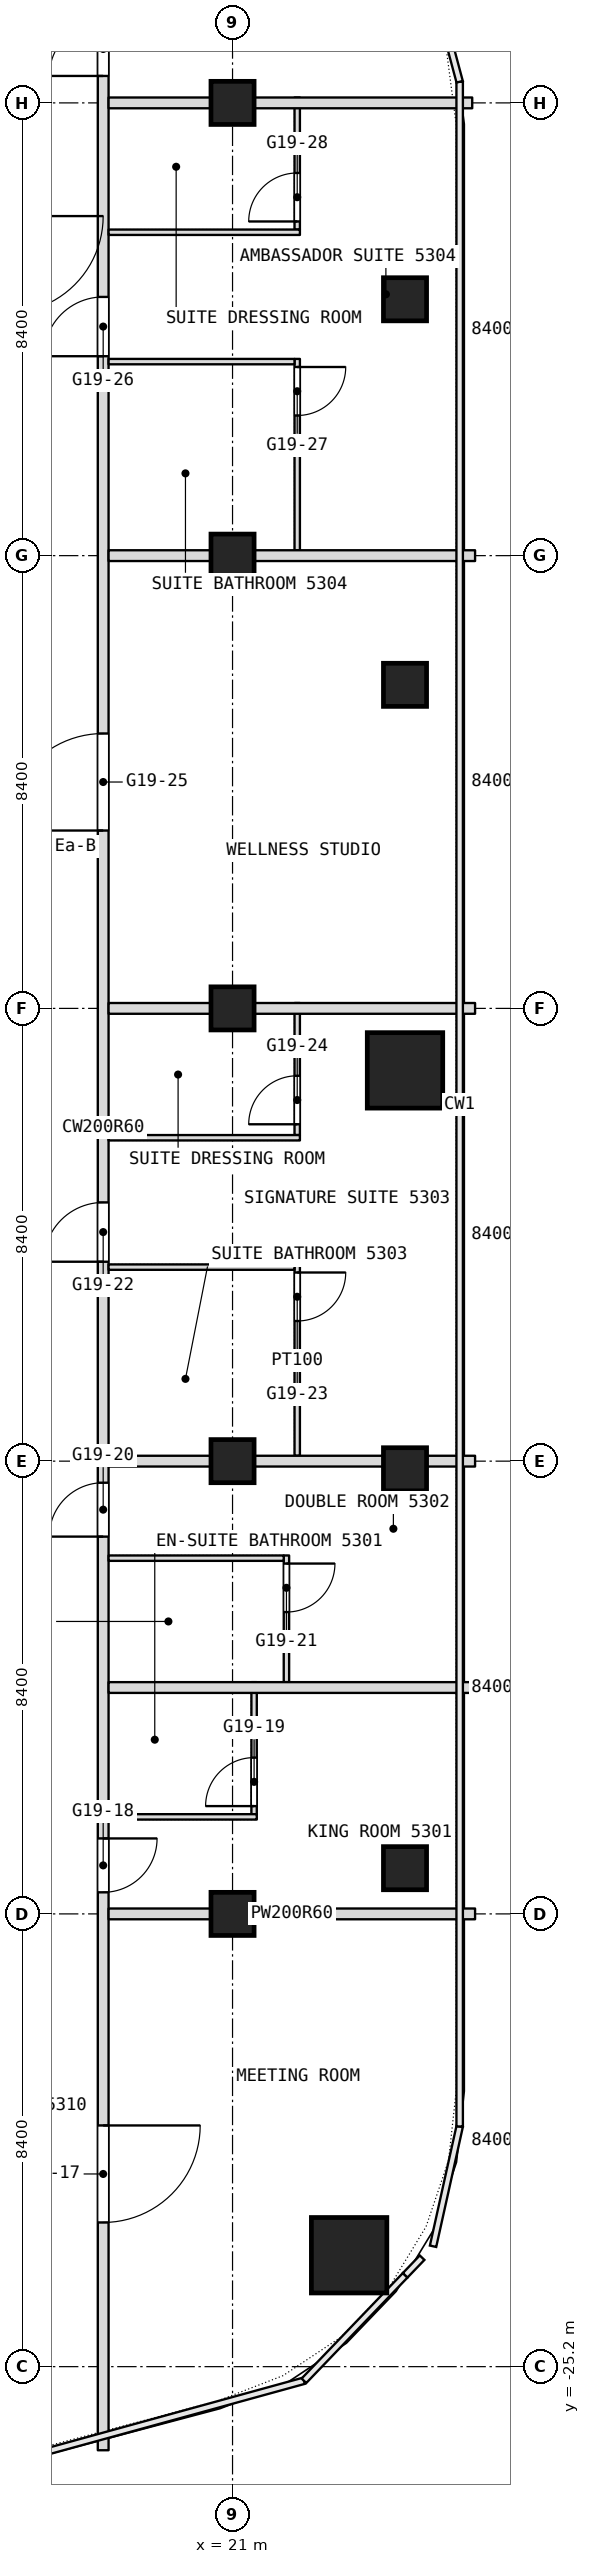
"""IFC4 building model, lengths in metres.
Left out: names, types, materials, properties, quantities, classifications, styles, units other than length and angle.
Written with IfcOpenShell. Run it as: python <this file> out.ifc"""

import sys

from ifc_helpers import new_model, si_unit, direction, frame, frame_2d, origin, origin_2d, place, context, subcontext, project, spatial, rectangle, extrude, element, fill, save


model = new_model("IFC4")
c1 = context("Model", 3, precision=1e-05, world=origin(), true_north=direction((0.0, 1.0)))
c2 = subcontext(c1, "Body", "Model", "MODEL_VIEW")
j1 = project(units=[si_unit("LENGTHUNIT", "METRE"), si_unit("PLANEANGLEUNIT", "RADIAN")], contexts=[c1])
p1 = place(None, origin())
s1 = spatial("IfcSite", under=j1, at=p1, CompositionType="ELEMENT")
p2 = place(p1, origin())
s2 = spatial("IfcBuilding", under=s1, at=p2, CompositionType="ELEMENT")
p3 = place(p2, frame((0.0, 0.0, 227.3)))
s3 = spatial("IfcBuildingStorey", under=s2, at=p3, CompositionType="ELEMENT", Elevation=227.3)
for number, where, z_axis, x_axis in (
    (1, (23.163, -23.133, 0.0), (0.0, 0.0, 1.0), (1.0, 0.0, 0.0)),
    (2, (24.2, -1.15, 0.0), (0.0, 0.0, 1.0), (1.0, 0.0, 0.0)),
):
    element("IfcColumn", number, at=place(p3, frame(where, z_axis=z_axis, x_axis=x_axis)), inside=s3, PredefinedType="COLUMN", context=c2, shape_type="SweptSolid", body=[
        extrude(rectangle(XDim=1.4, YDim=1.4, at=origin_2d()), origin(), (0.0, 0.0, 1.0), 3.6),
    ])
for number, where, z_axis, x_axis in (
    (3, (21.0, -16.8, 0.0), (0.0, 0.0, 1.0), (1.0, 0.0, 0.0)),
    (4, (21.0, -8.4, 0.0), (0.0, 0.0, 1.0), (1.0, 0.0, 0.0)),
    (5, (21.0, 0.0, 0.0), (0.0, 0.0, 1.0), (1.0, 0.0, 0.0)),
    (6, (21.0, 8.4, 0.0), (0.0, 0.0, 1.0), (1.0, 0.0, 0.0)),
    (7, (21.0, 16.8, 0.0), (0.0, 0.0, 1.0), (1.0, 0.0, 0.0)),
    (8, (24.2, 13.156, 0.0), (0.0, 0.0, 1.0), (1.0, 0.0, 0.0)),
    (9, (24.2, 6.003, 0.0), (0.0, 0.0, 1.0), (1.0, 0.0, 0.0)),
    (10, (24.2, -8.551, 0.0), (0.0, 0.0, 1.0), (1.0, 0.0, 0.0)),
    (11, (24.2, -15.952, 0.0), (0.0, 0.0, 1.0), (1.0, 0.0, 0.0)),
):
    element("IfcColumn", number, at=place(p3, frame(where, z_axis=z_axis, x_axis=x_axis)), inside=s3, PredefinedType="COLUMN", context=c2, shape_type="SweptSolid", body=[
        extrude(rectangle(XDim=0.8, YDim=0.8, at=origin_2d()), origin(), (0.0, 0.0, 1.0), 3.6),
    ])
p4 = place(p3, frame((22.2, -8.3, 0.0), z_axis=(0.0, 0.0, 1.0), x_axis=(0.0, 1.0, 0.0)))
e12 = element("IfcWall", 12, at=p4, inside=s3, PredefinedType="PARTITIONING", context=c2, shape_type="SweptSolid", body=[
    extrude(rectangle(XDim=3.55, YDim=0.1, at=frame_2d((1.775, 0.0))), origin(), (0.0, 0.0, 1.0), 3.34),
])
p5 = place(p4, frame((2.5, 0.0, 0.0)))
e13 = element("IfcOpeningElement", 13, at=p5, cuts=e12, PredefinedType="OPENING", context=c2, shape_type="SweptSolid", body=[
    extrude(rectangle(XDim=0.9, YDim=2.1, at=frame_2d((0.45, 1.05))), frame((0.0, 0.05, 0.0), z_axis=(0.0, -1.0, 0.0), x_axis=(1.0, 0.0, 0.0)), (0.0, 0.0, 1.0), 0.1),
])
p6 = place(p3, frame((22.2, -2.35, 0.0), z_axis=(0.0, 0.0, 1.0), x_axis=(0.0, 1.0, 0.0)))
e14 = element("IfcWall", 14, at=p6, inside=s3, PredefinedType="PARTITIONING", context=c2, shape_type="SweptSolid", body=[
    extrude(rectangle(XDim=2.45, YDim=0.1, at=frame_2d((1.225, 0.0))), origin(), (0.0, 0.0, 1.0), 3.34),
])
p7 = place(p6, frame((0.2, 0.0, 0.0)))
e15 = element("IfcOpeningElement", 15, at=p7, cuts=e14, PredefinedType="OPENING", context=c2, shape_type="SweptSolid", body=[
    extrude(rectangle(XDim=0.9, YDim=2.1, at=frame_2d((0.45, 1.05))), frame((0.0, 0.05, 0.0), z_axis=(0.0, -1.0, 0.0), x_axis=(1.0, 0.0, 0.0)), (0.0, 0.0, 1.0), 0.1),
])
p8 = place(p3, frame((22.2, 8.5, 0.0), z_axis=(0.0, 0.0, 1.0), x_axis=(0.0, 1.0, 0.0)))
e16 = element("IfcWall", 16, at=p8, inside=s3, PredefinedType="PARTITIONING", context=c2, shape_type="SweptSolid", body=[
    extrude(rectangle(XDim=3.55, YDim=0.1, at=frame_2d((1.775, 0.0))), origin(), (0.0, 0.0, 1.0), 3.34),
])
p9 = place(p8, frame((2.5, 0.0, 0.0)))
e17 = element("IfcOpeningElement", 17, at=p9, cuts=e16, PredefinedType="OPENING", context=c2, shape_type="SweptSolid", body=[
    extrude(rectangle(XDim=0.9, YDim=2.1, at=frame_2d((0.45, 1.05))), frame((0.0, 0.05, 0.0), z_axis=(0.0, -1.0, 0.0), x_axis=(1.0, 0.0, 0.0)), (0.0, 0.0, 1.0), 0.1),
])
p10 = place(p3, frame((22.2, 14.45, 0.0), z_axis=(0.0, 0.0, 1.0), x_axis=(0.0, 1.0, 0.0)))
e18 = element("IfcWall", 18, at=p10, inside=s3, PredefinedType="PARTITIONING", context=c2, shape_type="SweptSolid", body=[
    extrude(rectangle(XDim=2.45, YDim=0.1, at=frame_2d((1.225, 0.0))), origin(), (0.0, 0.0, 1.0), 3.34),
])
p11 = place(p10, frame((0.15, 0.0, 0.0)))
e19 = element("IfcOpeningElement", 19, at=p11, cuts=e18, PredefinedType="OPENING", context=c2, shape_type="SweptSolid", body=[
    extrude(rectangle(XDim=0.9, YDim=2.1, at=frame_2d((0.45, 1.05))), frame((0.0, 0.05, 0.0), z_axis=(0.0, -1.0, 0.0), x_axis=(1.0, 0.0, 0.0)), (0.0, 0.0, 1.0), 0.1),
])
p12 = place(p3, frame((22.0, -12.5, 0.0), z_axis=(0.0, 0.0, 1.0), x_axis=(0.0, 1.0, 0.0)))
e20 = element("IfcWall", 20, at=p12, inside=s3, PredefinedType="PARTITIONING", context=c2, shape_type="SweptSolid", body=[
    extrude(rectangle(XDim=2.35, YDim=0.1, at=frame_2d((1.175, 0.0))), origin(), (0.0, 0.0, 1.0), 3.34),
])
p13 = place(p12, frame((1.3, 0.0, 0.0)))
e21 = element("IfcOpeningElement", 21, at=p13, cuts=e20, PredefinedType="OPENING", context=c2, shape_type="SweptSolid", body=[
    extrude(rectangle(XDim=0.9, YDim=2.1, at=frame_2d((0.45, 1.05))), frame((0.0, 0.05, 0.0), z_axis=(0.0, -1.0, 0.0), x_axis=(1.0, 0.0, 0.0)), (0.0, 0.0, 1.0), 0.1),
])
p14 = place(p3, frame((21.4, -14.95, 0.0), z_axis=(0.0, 0.0, 1.0), x_axis=(0.0, 1.0, 0.0)))
e22 = element("IfcWall", 22, at=p14, inside=s3, PredefinedType="PARTITIONING", context=c2, shape_type="SweptSolid", body=[
    extrude(rectangle(XDim=2.45, YDim=0.1, at=frame_2d((1.225, 0.0))), origin(), (0.0, 0.0, 1.0), 3.34),
])
p15 = place(p14, frame((0.15, 0.0, 0.0)))
e23 = element("IfcOpeningElement", 23, at=p15, cuts=e22, PredefinedType="OPENING", context=c2, shape_type="SweptSolid", body=[
    extrude(rectangle(XDim=0.9, YDim=2.1, at=frame_2d((0.45, 1.05))), frame((0.0, 0.05, 0.0), z_axis=(0.0, -1.0, 0.0), x_axis=(1.0, 0.0, 0.0)), (0.0, 0.0, 1.0), 0.1),
])
p16 = place(p3, frame((18.6, -26.751, 0.0), z_axis=(0.0, 0.0, 1.0), x_axis=(0.0, 1.0, 0.0)))
e24 = element("IfcWall", 24, at=p16, inside=s3, PredefinedType="PARTITIONING", context=c2, shape_type="SweptSolid", body=[
    extrude(rectangle(XDim=49.091, YDim=0.2, at=frame_2d((24.545, 0.0))), origin(), (0.0, 0.0, 1.0), 3.34),
])
p17 = place(p16, frame((4.226, 0.0, 0.0)))
e25 = element("IfcOpeningElement", 25, at=p17, cuts=e24, PredefinedType="OPENING", context=c2, shape_type="SweptSolid", body=[
    extrude(rectangle(XDim=1.8, YDim=2.1, at=frame_2d((0.9, 1.05))), frame((0.0, 0.1, 0.0), z_axis=(0.0, -1.0, 0.0), x_axis=(1.0, 0.0, 0.0)), (0.0, 0.0, 1.0), 0.2),
])
p18 = place(p16, frame((10.351, 0.0, 0.0)))
e26 = element("IfcOpeningElement", 26, at=p18, cuts=e24, PredefinedType="OPENING", context=c2, shape_type="SweptSolid", body=[
    extrude(rectangle(XDim=1.0, YDim=2.1, at=frame_2d((0.5, 1.05))), frame((0.0, 0.1, 0.0), z_axis=(0.0, -1.0, 0.0), x_axis=(1.0, 0.0, 0.0)), (0.0, 0.0, 1.0), 0.2),
])
p19 = place(p16, frame((16.951, 0.0, 0.0)))
e27 = element("IfcOpeningElement", 27, at=p19, cuts=e24, PredefinedType="OPENING", context=c2, shape_type="SweptSolid", body=[
    extrude(rectangle(XDim=1.0, YDim=2.1, at=frame_2d((0.5, 1.05))), frame((0.0, 0.1, 0.0), z_axis=(0.0, -1.0, 0.0), x_axis=(1.0, 0.0, 0.0)), (0.0, 0.0, 1.0), 0.2),
])
p20 = place(p16, frame((22.051, 0.0, 0.0)))
e28 = element("IfcOpeningElement", 28, at=p20, cuts=e24, PredefinedType="OPENING", context=c2, shape_type="SweptSolid", body=[
    extrude(rectangle(XDim=1.1, YDim=2.1, at=frame_2d((0.55, 1.05))), frame((0.0, 0.1, 0.0), z_axis=(0.0, -1.0, 0.0), x_axis=(1.0, 0.0, 0.0)), (0.0, 0.0, 1.0), 0.2),
])
p21 = place(p16, frame((30.051, 0.0, 0.0)))
e29 = element("IfcOpeningElement", 29, at=p21, cuts=e24, PredefinedType="OPENING", context=c2, shape_type="SweptSolid", body=[
    extrude(rectangle(XDim=1.8, YDim=2.1, at=frame_2d((0.9, 1.05))), frame((0.0, 0.1, 0.0), z_axis=(0.0, -1.0, 0.0), x_axis=(1.0, 0.0, 0.0)), (0.0, 0.0, 1.0), 0.2),
])
p22 = place(p16, frame((38.851, 0.0, 0.0)))
e30 = element("IfcOpeningElement", 30, at=p22, cuts=e24, PredefinedType="OPENING", context=c2, shape_type="SweptSolid", body=[
    extrude(rectangle(XDim=1.1, YDim=2.1, at=frame_2d((0.55, 1.05))), frame((0.0, 0.1, 0.0), z_axis=(0.0, -1.0, 0.0), x_axis=(1.0, 0.0, 0.0)), (0.0, 0.0, 1.0), 0.2),
])
p23 = place(p16, frame((44.051, 0.0, 0.0)))
e31 = element("IfcOpeningElement", 31, at=p23, cuts=e24, PredefinedType="OPENING", context=c2, shape_type="SweptSolid", body=[
    extrude(rectangle(XDim=1.0, YDim=2.1, at=frame_2d((0.5, 1.05))), frame((0.0, 0.1, 0.0), z_axis=(0.0, -1.0, 0.0), x_axis=(1.0, 0.0, 0.0)), (0.0, 0.0, 1.0), 0.2),
])
p24 = place(p3, frame((18.7, -16.8, 0.0), z_axis=(0.0, 0.0, 1.0), x_axis=(1.0, 0.0, 0.0)))
e32 = element("IfcWall", 32, at=p24, inside=s3, PredefinedType="PARTITIONING", context=c2, shape_type="SweptSolid", body=[
    extrude(rectangle(XDim=6.8, YDim=0.2, at=frame_2d((3.4, 0.0))), origin(), (0.0, 0.0, 1.0), 2.94),
])
p25 = place(p3, frame((18.7, -15.0, 0.0), z_axis=(0.0, 0.0, 1.0), x_axis=(1.0, 0.0, 0.0)))
e33 = element("IfcWall", 33, at=p25, inside=s3, PredefinedType="PARTITIONING", context=c2, shape_type="SweptSolid", body=[
    extrude(rectangle(XDim=2.75, YDim=0.1, at=frame_2d((1.375, 0.0))), origin(), (0.0, 0.0, 1.0), 3.34),
])
p26 = place(p3, frame((18.7, -12.6, 0.0), z_axis=(0.0, 0.0, 1.0), x_axis=(1.0, 0.0, 0.0)))
e34 = element("IfcWall", 34, at=p26, inside=s3, PredefinedType="PARTITIONING", context=c2, shape_type="SweptSolid", body=[
    extrude(rectangle(XDim=6.8, YDim=0.2, at=frame_2d((3.4, 0.0))), origin(), (0.0, 0.0, 1.0), 3.34),
])
p27 = place(p3, frame((18.7, -10.2, 0.0), z_axis=(0.0, 0.0, 1.0), x_axis=(1.0, 0.0, 0.0)))
e35 = element("IfcWall", 35, at=p27, inside=s3, PredefinedType="PARTITIONING", context=c2, shape_type="SweptSolid", body=[
    extrude(rectangle(XDim=3.25, YDim=0.1, at=frame_2d((1.625, 0.0))), origin(), (0.0, 0.0, 1.0), 3.34),
])
p28 = place(p3, frame((18.7, -8.4, 0.0), z_axis=(0.0, 0.0, 1.0), x_axis=(1.0, 0.0, 0.0)))
e36 = element("IfcWall", 36, at=p28, inside=s3, PredefinedType="PARTITIONING", context=c2, shape_type="SweptSolid", body=[
    extrude(rectangle(XDim=6.8, YDim=0.2, at=frame_2d((3.4, 0.0))), origin(), (0.0, 0.0, 1.0), 2.94),
])
p29 = place(p3, frame((18.7, -4.8, 0.0), z_axis=(0.0, 0.0, 1.0), x_axis=(1.0, 0.0, 0.0)))
e37 = element("IfcWall", 37, at=p29, inside=s3, PredefinedType="PARTITIONING", context=c2, shape_type="SweptSolid", body=[
    extrude(rectangle(XDim=3.45, YDim=0.1, at=frame_2d((1.725, 0.0))), origin(), (0.0, 0.0, 1.0), 3.34),
])
p30 = place(p3, frame((18.7, -2.4, 0.0), z_axis=(0.0, 0.0, 1.0), x_axis=(1.0, 0.0, 0.0)))
e38 = element("IfcWall", 38, at=p30, inside=s3, PredefinedType="PARTITIONING", context=c2, shape_type="SweptSolid", body=[
    extrude(rectangle(XDim=3.55, YDim=0.1, at=frame_2d((1.775, 0.0))), origin(), (0.0, 0.0, 1.0), 3.34),
])
for number, where, z_axis, x_axis in (
    (39, (18.7, 0.0, 0.0), (0.0, 0.0, 1.0), (1.0, 0.0, 0.0)),
    (40, (18.7, 8.4, 0.0), (0.0, 0.0, 1.0), (1.0, 0.0, 0.0)),
):
    element("IfcWall", number, at=place(p3, frame(where, z_axis=z_axis, x_axis=x_axis)), inside=s3, PredefinedType="PARTITIONING", context=c2, shape_type="SweptSolid", body=[
        extrude(rectangle(XDim=6.8, YDim=0.2, at=frame_2d((3.4, 0.0))), origin(), (0.0, 0.0, 1.0), 2.94),
    ])
p31 = place(p3, frame((18.7, 12.0, 0.0), z_axis=(0.0, 0.0, 1.0), x_axis=(1.0, 0.0, 0.0)))
e41 = element("IfcWall", 41, at=p31, inside=s3, PredefinedType="PARTITIONING", context=c2, shape_type="SweptSolid", body=[
    extrude(rectangle(XDim=3.45, YDim=0.1, at=frame_2d((1.725, 0.0))), origin(), (0.0, 0.0, 1.0), 3.34),
])
p32 = place(p3, frame((18.7, 14.4, 0.0), z_axis=(0.0, 0.0, 1.0), x_axis=(1.0, 0.0, 0.0)))
e42 = element("IfcWall", 42, at=p32, inside=s3, PredefinedType="PARTITIONING", context=c2, shape_type="SweptSolid", body=[
    extrude(rectangle(XDim=3.55, YDim=0.1, at=frame_2d((1.775, 0.0))), origin(), (0.0, 0.0, 1.0), 3.34),
])
p33 = place(p3, frame((18.7, 16.8, 0.0), z_axis=(0.0, 0.0, 1.0), x_axis=(1.0, 0.0, 0.0)))
e43 = element("IfcWall", 43, at=p33, inside=s3, PredefinedType="PARTITIONING", context=c2, shape_type="SweptSolid", body=[
    extrude(rectangle(XDim=6.747, YDim=0.2, at=frame_2d((3.374, 0.0))), origin(), (0.0, 0.0, 1.0), 2.94),
])
p34 = place(p5, origin())
e44 = element("IfcDoor", 44, at=p34, inside=s3, OperationType="SINGLE_SWING_RIGHT", PredefinedType="DOOR", context=c2, shape_type="SweptSolid", body=[
    extrude(rectangle(XDim=0.9, YDim=2.1, at=frame_2d((0.45, 1.05))), frame((0.0, 0.025, 0.0), z_axis=(0.0, -1.0, 0.0), x_axis=(1.0, 0.0, 0.0)), (0.0, 0.0, 1.0), 0.05),
])
fill(e13, e44)
p35 = place(p7, origin())
e45 = element("IfcDoor", 45, at=p35, inside=s3, OperationType="SINGLE_SWING_LEFT", PredefinedType="DOOR", context=c2, shape_type="SweptSolid", body=[
    extrude(rectangle(XDim=0.9, YDim=2.1, at=frame_2d((0.45, 1.05))), frame((0.0, 0.025, 0.0), z_axis=(0.0, -1.0, 0.0), x_axis=(1.0, 0.0, 0.0)), (0.0, 0.0, 1.0), 0.05),
])
fill(e15, e45)
p36 = place(p9, origin())
e46 = element("IfcDoor", 46, at=p36, inside=s3, OperationType="SINGLE_SWING_RIGHT", PredefinedType="DOOR", context=c2, shape_type="SweptSolid", body=[
    extrude(rectangle(XDim=0.9, YDim=2.1, at=frame_2d((0.45, 1.05))), frame((0.0, 0.025, 0.0), z_axis=(0.0, -1.0, 0.0), x_axis=(1.0, 0.0, 0.0)), (0.0, 0.0, 1.0), 0.05),
])
fill(e17, e46)
p37 = place(p11, origin())
e47 = element("IfcDoor", 47, at=p37, inside=s3, OperationType="SINGLE_SWING_LEFT", PredefinedType="DOOR", context=c2, shape_type="SweptSolid", body=[
    extrude(rectangle(XDim=0.9, YDim=2.1, at=frame_2d((0.45, 1.05))), frame((0.0, 0.025, 0.0), z_axis=(0.0, -1.0, 0.0), x_axis=(1.0, 0.0, 0.0)), (0.0, 0.0, 1.0), 0.05),
])
fill(e19, e47)
p38 = place(p13, origin())
e48 = element("IfcDoor", 48, at=p38, inside=s3, OperationType="SINGLE_SWING_RIGHT", PredefinedType="DOOR", context=c2, shape_type="SweptSolid", body=[
    extrude(rectangle(XDim=0.9, YDim=2.1, at=frame_2d((0.45, 1.05))), frame((0.0, 0.025, 0.0), z_axis=(0.0, -1.0, 0.0), x_axis=(1.0, 0.0, 0.0)), (0.0, 0.0, 1.0), 0.05),
])
fill(e21, e48)
p39 = place(p15, origin())
e49 = element("IfcDoor", 49, at=p39, inside=s3, OperationType="SINGLE_SWING_LEFT", PredefinedType="DOOR", context=c2, shape_type="SweptSolid", body=[
    extrude(rectangle(XDim=0.9, YDim=2.1, at=frame_2d((0.45, 1.05))), frame((0.0, 0.025, 0.0), z_axis=(0.0, -1.0, 0.0), x_axis=(1.0, 0.0, 0.0)), (0.0, 0.0, 1.0), 0.05),
])
fill(e23, e49)
p40 = place(p17, origin())
e50 = element("IfcDoor", 50, at=p40, inside=s3, OperationType="DOUBLE_DOOR_SINGLE_SWING", PredefinedType="DOOR", context=c2, shape_type="SweptSolid", body=[
    extrude(rectangle(XDim=1.8, YDim=2.1, at=frame_2d((0.9, 1.05))), frame((0.0, 0.025, 0.0), z_axis=(0.0, -1.0, 0.0), x_axis=(1.0, 0.0, 0.0)), (0.0, 0.0, 1.0), 0.05),
])
fill(e25, e50)
p41 = place(p18, origin())
e51 = element("IfcDoor", 51, at=p41, inside=s3, OperationType="SINGLE_SWING_RIGHT", PredefinedType="DOOR", context=c2, shape_type="SweptSolid", body=[
    extrude(rectangle(XDim=1.0, YDim=2.1, at=frame_2d((0.5, 1.05))), frame((0.0, 0.025, 0.0), z_axis=(0.0, -1.0, 0.0), x_axis=(1.0, 0.0, 0.0)), (0.0, 0.0, 1.0), 0.05),
])
fill(e26, e51)
p42 = place(p19, origin())
e52 = element("IfcDoor", 52, at=p42, inside=s3, OperationType="SINGLE_SWING_RIGHT", PredefinedType="DOOR", context=c2, shape_type="SweptSolid", body=[
    extrude(rectangle(XDim=1.0, YDim=2.1, at=frame_2d((0.5, 1.05))), frame((0.0, 0.025, 0.0), z_axis=(0.0, -1.0, 0.0), x_axis=(1.0, 0.0, 0.0)), (0.0, 0.0, 1.0), 0.05),
])
fill(e27, e52)
p43 = place(p20, origin())
e53 = element("IfcDoor", 53, at=p43, inside=s3, OperationType="SINGLE_SWING_RIGHT", PredefinedType="DOOR", context=c2, shape_type="SweptSolid", body=[
    extrude(rectangle(XDim=1.1, YDim=2.1, at=frame_2d((0.55, 1.05))), frame((0.0, 0.025, 0.0), z_axis=(0.0, -1.0, 0.0), x_axis=(1.0, 0.0, 0.0)), (0.0, 0.0, 1.0), 0.05),
])
fill(e28, e53)
p44 = place(p21, origin())
e54 = element("IfcDoor", 54, at=p44, inside=s3, OperationType="DOUBLE_DOOR_SINGLE_SWING", PredefinedType="DOOR", context=c2, shape_type="SweptSolid", body=[
    extrude(rectangle(XDim=1.8, YDim=2.1, at=frame_2d((0.9, 1.05))), frame((0.0, 0.025, 0.0), z_axis=(0.0, -1.0, 0.0), x_axis=(1.0, 0.0, 0.0)), (0.0, 0.0, 1.0), 0.05),
])
fill(e29, e54)
p45 = place(p22, origin())
e55 = element("IfcDoor", 55, at=p45, inside=s3, OperationType="SINGLE_SWING_RIGHT", PredefinedType="DOOR", context=c2, shape_type="SweptSolid", body=[
    extrude(rectangle(XDim=1.1, YDim=2.1, at=frame_2d((0.55, 1.05))), frame((0.0, 0.025, 0.0), z_axis=(0.0, -1.0, 0.0), x_axis=(1.0, 0.0, 0.0)), (0.0, 0.0, 1.0), 0.05),
])
fill(e30, e55)
p46 = place(p23, origin())
e56 = element("IfcDoor", 56, at=p46, inside=s3, OperationType="SINGLE_SWING_LEFT", PredefinedType="DOOR", context=c2, shape_type="SweptSolid", body=[
    extrude(rectangle(XDim=1.0, YDim=2.1, at=frame_2d((0.5, 1.05))), frame((0.0, 0.025, 0.0), z_axis=(0.0, -1.0, 0.0), x_axis=(1.0, 0.0, 0.0)), (0.0, 0.0, 1.0), 0.05),
])
fill(e31, e56)
save(model, sys.argv[1])
